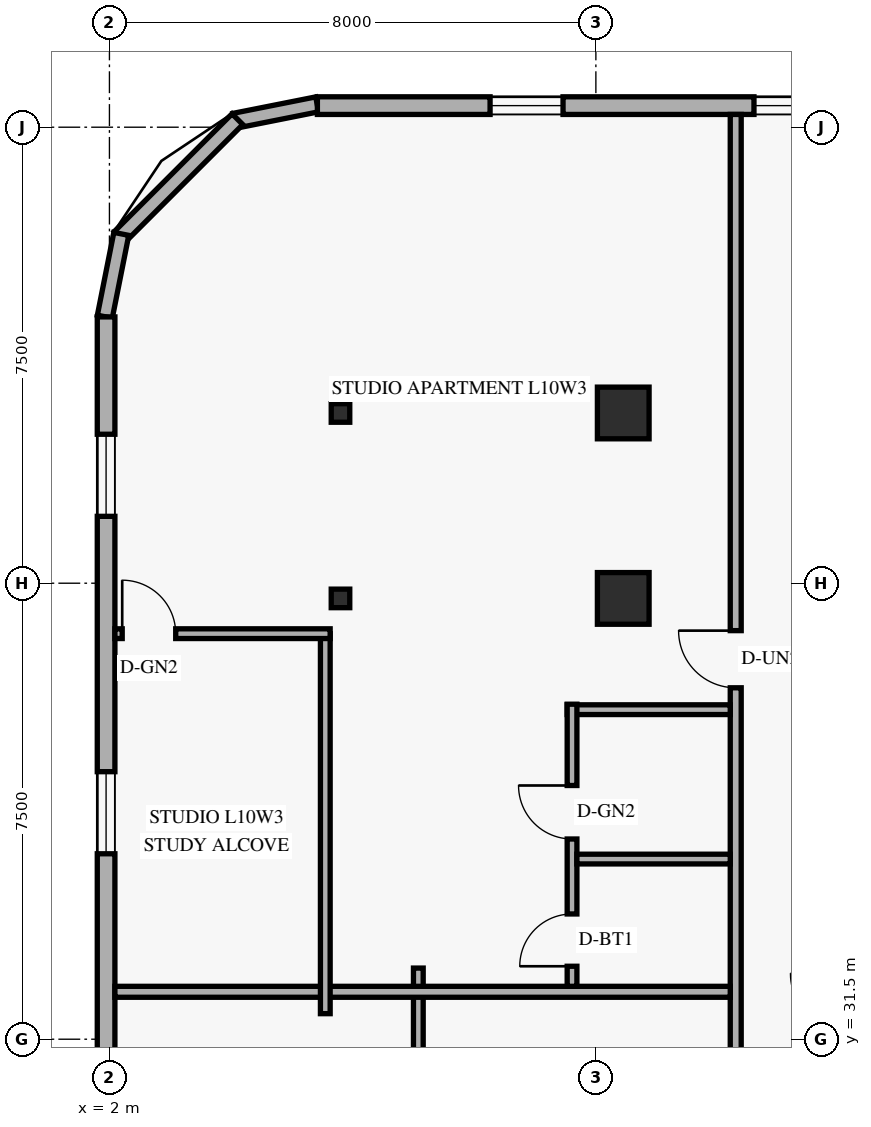
"""IFC4 building model, lengths in metres.
Left out: names, types, materials, properties, quantities, classifications, styles, units other than length and angle.
Written with IfcOpenShell. Run it as: python <this file> out.ifc"""

import sys

from ifc_helpers import new_model, si_unit, direction, frame, frame_2d, origin, origin_2d, place, context, subcontext, project, spatial, rectangle, hollow_rectangle, extrude, element, fill, save


model = new_model("IFC4")
c1 = context("Model", 3, precision=1e-05, world=origin(), true_north=direction((0.0, 1.0)))
c2 = subcontext(c1, "Body", "Model", "MODEL_VIEW")
j1 = project(units=[si_unit("LENGTHUNIT", "METRE"), si_unit("PLANEANGLEUNIT", "RADIAN")], contexts=[c1])
p1 = place(None, origin())
s1 = spatial("IfcSite", under=j1, at=p1, CompositionType="ELEMENT")
p2 = place(p1, origin())
s2 = spatial("IfcBuilding", under=s1, at=p2, CompositionType="ELEMENT")
p3 = place(p2, frame((0.0, 0.0, 42.0)))
s3 = spatial("IfcBuildingStorey", under=s2, at=p3, CompositionType="ELEMENT", Elevation=42.0)
for number, where, z_axis, x_axis in (
    (1, (5.8, 38.75, 0.0), (0.0, 0.0, 1.0), (1.0, 0.0, 0.0)),
    (2, (5.8, 41.8, 0.0), (0.0, 0.0, 1.0), (1.0, 0.0, 0.0)),
):
    element("IfcColumn", number, at=place(p3, frame(where, z_axis=z_axis, x_axis=x_axis)), inside=s3, PredefinedType="COLUMN", context=c2, shape_type="SweptSolid", body=[
        extrude(hollow_rectangle(XDim=0.305, YDim=0.305, WallThickness=0.013, at=origin_2d()), origin(), (0.0, 0.0, 1.0), 3.6),
    ])
for number, where, z_axis, x_axis in (
    (3, (10.45, 38.75, 0.0), (0.0, 0.0, 1.0), (1.0, 0.0, 0.0)),
    (4, (10.45, 41.8, 0.0), (0.0, 0.0, 1.0), (1.0, 0.0, 0.0)),
):
    element("IfcColumn", number, at=place(p3, frame(where, z_axis=z_axis, x_axis=x_axis)), inside=s3, PredefinedType="COLUMN", context=c2, shape_type="SweptSolid", body=[
        extrude(rectangle(XDim=0.85, YDim=0.85, at=origin_2d()), origin(), (0.0, 0.0, 1.0), 3.6),
    ])
p4 = place(p3, frame((5.417, 46.876, 0.0), z_axis=(0.0, 0.0, 1.0), x_axis=(-0.980809899341, -0.19496651342, 0.0)))
e5 = element("IfcWall", 5, at=p4, inside=s3, PredefinedType="SOLIDWALL", context=c2, shape_type="SweptSolid", body=[
    extrude(rectangle(XDim=1.389, YDim=0.25, at=frame_2d((0.694, 0.0))), origin(), (0.0, 0.0, 1.0), 3.36),
])
p5 = place(p3, frame((4.105, 46.632, 0.0), z_axis=(0.0, 0.0, 1.0), x_axis=(-0.707106781187, -0.707106781187, 0.0)))
e6 = element("IfcWall", 6, at=p5, inside=s3, PredefinedType="SOLIDWALL", context=c2, shape_type="SweptSolid", body=[
    extrude(rectangle(XDim=2.739, YDim=0.25, at=frame_2d((1.37, 0.0))), origin(), (0.0, 0.0, 1.0), 3.36),
])
p6 = place(p3, frame((2.195, 44.746, 0.0), z_axis=(0.0, 0.0, 1.0), x_axis=(-0.19496651342, -0.980809899341, 0.0)))
e7 = element("IfcWall", 7, at=p6, inside=s3, PredefinedType="SOLIDWALL", context=c2, shape_type="SweptSolid", body=[
    extrude(rectangle(XDim=1.389, YDim=0.25, at=frame_2d((0.694, 0.0))), origin(), (0.0, 0.0, 1.0), 3.36),
])
p7 = place(p3, frame((44.98, 46.855, 0.0), z_axis=(0.0, 0.0, 1.0), x_axis=(-1.0, 0.0, 0.0)))
e8 = element("IfcWall", 8, at=p7, inside=s3, PredefinedType="SOLIDWALL", context=c2, shape_type="SweptSolid", body=[
    extrude(rectangle(XDim=39.56, YDim=0.29, at=frame_2d((19.78, 0.0))), origin(), (0.0, 0.0, 1.0), 3.36),
])
p8 = place(p7, frame((35.52, 0.0, 0.85)))
e9 = element("IfcOpeningElement", 9, at=p8, cuts=e8, PredefinedType="OPENING", context=c2, shape_type="SweptSolid", body=[
    extrude(rectangle(XDim=1.2, YDim=1.5, at=frame_2d((0.6, 0.75))), frame((0.0, 0.155, 0.0), z_axis=(0.0, -1.0, 0.0), x_axis=(1.0, 0.0, 0.0)), (0.0, 0.0, 1.0), 0.31),
])
p9 = place(p7, frame((31.18, 0.0, 0.85)))
e10 = element("IfcOpeningElement", 10, at=p9, cuts=e8, PredefinedType="OPENING", context=c2, shape_type="SweptSolid", body=[
    extrude(rectangle(XDim=1.2, YDim=1.5, at=frame_2d((0.6, 0.75))), frame((0.0, 0.155, 0.0), z_axis=(0.0, -1.0, 0.0), x_axis=(1.0, 0.0, 0.0)), (0.0, 0.0, 1.0), 0.31),
])
p10 = place(p7, frame((25.909, 0.0, 0.85)))
e11 = element("IfcOpeningElement", 11, at=p10, cuts=e8, PredefinedType="OPENING", context=c2, shape_type="SweptSolid", body=[
    extrude(rectangle(XDim=1.2, YDim=1.5, at=frame_2d((0.6, 0.75))), frame((0.0, 0.155, 0.0), z_axis=(0.0, -1.0, 0.0), x_axis=(1.0, 0.0, 0.0)), (0.0, 0.0, 1.0), 0.31),
])
p11 = place(p7, frame((18.874, 0.0, 0.85)))
e12 = element("IfcOpeningElement", 12, at=p11, cuts=e8, PredefinedType="OPENING", context=c2, shape_type="SweptSolid", body=[
    extrude(rectangle(XDim=1.2, YDim=1.5, at=frame_2d((0.6, 0.75))), frame((0.0, 0.155, 0.0), z_axis=(0.0, -1.0, 0.0), x_axis=(1.0, 0.0, 0.0)), (0.0, 0.0, 1.0), 0.31),
])
p12 = place(p7, frame((12.584, 0.0, 0.85)))
e13 = element("IfcOpeningElement", 13, at=p12, cuts=e8, PredefinedType="OPENING", context=c2, shape_type="SweptSolid", body=[
    extrude(rectangle(XDim=1.2, YDim=1.5, at=frame_2d((0.6, 0.75))), frame((0.0, 0.155, 0.0), z_axis=(0.0, -1.0, 0.0), x_axis=(1.0, 0.0, 0.0)), (0.0, 0.0, 1.0), 0.31),
])
p13 = place(p7, frame((7.895, 0.0, 0.85)))
e14 = element("IfcOpeningElement", 14, at=p13, cuts=e8, PredefinedType="OPENING", context=c2, shape_type="SweptSolid", body=[
    extrude(rectangle(XDim=1.2, YDim=1.5, at=frame_2d((0.6, 0.75))), frame((0.0, 0.155, 0.0), z_axis=(0.0, -1.0, 0.0), x_axis=(1.0, 0.0, 0.0)), (0.0, 0.0, 1.0), 0.31),
])
p14 = place(p7, frame((5.408, 0.0, 0.85)))
e15 = element("IfcOpeningElement", 15, at=p14, cuts=e8, PredefinedType="OPENING", context=c2, shape_type="SweptSolid", body=[
    extrude(rectangle(XDim=1.2, YDim=1.5, at=frame_2d((0.6, 0.75))), frame((0.0, 0.155, 0.0), z_axis=(0.0, -1.0, 0.0), x_axis=(1.0, 0.0, 0.0)), (0.0, 0.0, 1.0), 0.31),
])
p15 = place(p7, frame((1.693, 0.0, 0.85)))
e16 = element("IfcOpeningElement", 16, at=p15, cuts=e8, PredefinedType="OPENING", context=c2, shape_type="SweptSolid", body=[
    extrude(rectangle(XDim=1.2, YDim=1.5, at=frame_2d((0.6, 0.75))), frame((0.0, 0.155, 0.0), z_axis=(0.0, -1.0, 0.0), x_axis=(1.0, 0.0, 0.0)), (0.0, 0.0, 1.0), 0.31),
])
p16 = place(p3, frame((1.945, 43.38, 0.0), z_axis=(0.0, 0.0, 1.0), x_axis=(0.0, -1.0, 0.0)))
e17 = element("IfcWall", 17, at=p16, inside=s3, PredefinedType="SOLIDWALL", context=c2, shape_type="SweptSolid", body=[
    extrude(rectangle(XDim=38.76, YDim=0.29, at=frame_2d((19.38, 0.0))), origin(), (0.0, 0.0, 1.0), 3.36),
])
p17 = place(p16, frame((34.125, 0.0, 0.85)))
e18 = element("IfcOpeningElement", 18, at=p17, cuts=e17, PredefinedType="OPENING", context=c2, shape_type="SweptSolid", body=[
    extrude(rectangle(XDim=1.35, YDim=1.55, at=frame_2d((0.675, 0.775))), frame((0.0, 0.155, 0.0), z_axis=(0.0, -1.0, 0.0), x_axis=(1.0, 0.0, 0.0)), (0.0, 0.0, 1.0), 0.31),
])
p18 = place(p16, frame((28.115, 0.0, 0.85)))
e19 = element("IfcOpeningElement", 19, at=p18, cuts=e17, PredefinedType="OPENING", context=c2, shape_type="SweptSolid", body=[
    extrude(rectangle(XDim=1.35, YDim=1.55, at=frame_2d((0.675, 0.775))), frame((0.0, 0.155, 0.0), z_axis=(0.0, -1.0, 0.0), x_axis=(1.0, 0.0, 0.0)), (0.0, 0.0, 1.0), 0.31),
])
p19 = place(p16, frame((24.084, 0.0, 0.85)))
e20 = element("IfcOpeningElement", 20, at=p19, cuts=e17, PredefinedType="OPENING", context=c2, shape_type="SweptSolid", body=[
    extrude(rectangle(XDim=1.35, YDim=1.55, at=frame_2d((0.675, 0.775))), frame((0.0, 0.155, 0.0), z_axis=(0.0, -1.0, 0.0), x_axis=(1.0, 0.0, 0.0)), (0.0, 0.0, 1.0), 0.31),
])
p20 = place(p16, frame((18.259, 0.0, 0.85)))
e21 = element("IfcOpeningElement", 21, at=p20, cuts=e17, PredefinedType="OPENING", context=c2, shape_type="SweptSolid", body=[
    extrude(rectangle(XDim=1.35, YDim=1.55, at=frame_2d((0.675, 0.775))), frame((0.0, 0.155, 0.0), z_axis=(0.0, -1.0, 0.0), x_axis=(1.0, 0.0, 0.0)), (0.0, 0.0, 1.0), 0.31),
])
p21 = place(p16, frame((12.42, 0.0, 0.85)))
e22 = element("IfcOpeningElement", 22, at=p21, cuts=e17, PredefinedType="OPENING", context=c2, shape_type="SweptSolid", body=[
    extrude(rectangle(XDim=1.35, YDim=1.55, at=frame_2d((0.675, 0.775))), frame((0.0, 0.155, 0.0), z_axis=(0.0, -1.0, 0.0), x_axis=(1.0, 0.0, 0.0)), (0.0, 0.0, 1.0), 0.31),
])
p22 = place(p16, frame((7.48, 0.0, 0.85)))
e23 = element("IfcOpeningElement", 23, at=p22, cuts=e17, PredefinedType="OPENING", context=c2, shape_type="SweptSolid", body=[
    extrude(rectangle(XDim=1.35, YDim=1.55, at=frame_2d((0.675, 0.775))), frame((0.0, 0.155, 0.0), z_axis=(0.0, -1.0, 0.0), x_axis=(1.0, 0.0, 0.0)), (0.0, 0.0, 1.0), 0.31),
])
p23 = place(p16, frame((1.93, 0.0, 0.85)))
e24 = element("IfcOpeningElement", 24, at=p23, cuts=e17, PredefinedType="OPENING", context=c2, shape_type="SweptSolid", body=[
    extrude(rectangle(XDim=1.35, YDim=1.55, at=frame_2d((0.675, 0.775))), frame((0.0, 0.155, 0.0), z_axis=(0.0, -1.0, 0.0), x_axis=(1.0, 0.0, 0.0)), (0.0, 0.0, 1.0), 0.31),
])
p24 = place(p3, frame((12.3, 1.29, 0.0), z_axis=(0.0, 0.0, 1.0), x_axis=(0.0, 1.0, 0.0)))
e25 = element("IfcWall", 25, at=p24, inside=s3, PredefinedType="STANDARD", context=c2, shape_type="SweptSolid", body=[
    extrude(rectangle(XDim=45.42, YDim=0.18, at=frame_2d((22.71, 0.0))), origin(), (0.0, 0.0, 1.0), 2.649),
])
p25 = place(p24, frame((8.06, 0.0, 0.0)))
e26 = element("IfcOpeningElement", 26, at=p25, cuts=e25, PredefinedType="OPENING", context=c2, shape_type="SweptSolid", body=[
    extrude(rectangle(XDim=0.94, YDim=2.15, at=frame_2d((0.47, 1.075))), frame((0.0, 0.1, 0.0), z_axis=(0.0, -1.0, 0.0), x_axis=(1.0, 0.0, 0.0)), (0.0, 0.0, 1.0), 0.2),
])
p26 = place(p24, frame((21.021, 0.0, 0.0)))
e27 = element("IfcOpeningElement", 27, at=p26, cuts=e25, PredefinedType="OPENING", context=c2, shape_type="SweptSolid", body=[
    extrude(rectangle(XDim=0.94, YDim=2.15, at=frame_2d((0.47, 1.075))), frame((0.0, 0.1, 0.0), z_axis=(0.0, -1.0, 0.0), x_axis=(1.0, 0.0, 0.0)), (0.0, 0.0, 1.0), 0.2),
])
p27 = place(p24, frame((35.99, 0.0, 0.0)))
e28 = element("IfcOpeningElement", 28, at=p27, cuts=e25, PredefinedType="OPENING", context=c2, shape_type="SweptSolid", body=[
    extrude(rectangle(XDim=0.94, YDim=2.15, at=frame_2d((0.47, 1.075))), frame((0.0, 0.1, 0.0), z_axis=(0.0, -1.0, 0.0), x_axis=(1.0, 0.0, 0.0)), (0.0, 0.0, 1.0), 0.2),
])
p28 = place(p3, frame((7.08, 28.21, 0.0), z_axis=(0.0, 0.0, 1.0), x_axis=(0.0, 1.0, 0.0)))
e29 = element("IfcWall", 29, at=p28, inside=s3, PredefinedType="PARTITIONING", context=c2, shape_type="SweptSolid", body=[
    extrude(rectangle(XDim=4.46, YDim=0.16, at=frame_2d((2.23, 0.0))), origin(), (0.0, 0.0, 1.0), 2.649),
])
p29 = place(p3, frame((2.09, 32.28, 0.0), z_axis=(0.0, 0.0, 1.0), x_axis=(1.0, 0.0, 0.0)))
e30 = element("IfcWall", 30, at=p29, inside=s3, PredefinedType="PARTITIONING", context=c2, shape_type="SweptSolid", body=[
    extrude(rectangle(XDim=10.12, YDim=0.18, at=frame_2d((5.06, 0.0))), origin(), (0.0, 0.0, 1.0), 2.649),
])
p30 = place(p3, frame((9.528, 36.92, 0.0), z_axis=(0.0, 0.0, 1.0), x_axis=(1.0, 0.0, 0.0)))
e31 = element("IfcWall", 31, at=p30, inside=s3, PredefinedType="PLUMBINGWALL", context=c2, shape_type="SweptSolid", body=[
    extrude(rectangle(XDim=2.682, YDim=0.16, at=frame_2d((1.341, 0.0))), origin(), (0.0, 0.0, 1.0), 2.649),
])
p31 = place(p3, frame((9.608, 32.37, 0.0), z_axis=(0.0, 0.0, 1.0), x_axis=(0.0, 1.0, 0.0)))
e32 = element("IfcWall", 32, at=p31, inside=s3, PredefinedType="PLUMBINGWALL", context=c2, shape_type="SweptSolid", body=[
    extrude(rectangle(XDim=4.64, YDim=0.16, at=frame_2d((2.32, 0.0))), origin(), (0.0, 0.0, 1.0), 2.932),
])
p32 = place(p31, frame((0.33, 0.0, 0.0)))
e33 = element("IfcOpeningElement", 33, at=p32, cuts=e32, PredefinedType="OPENING", context=c2, shape_type="SweptSolid", body=[
    extrude(rectangle(XDim=0.86, YDim=2.12, at=frame_2d((0.43, 1.06))), frame((0.0, 0.09, 0.0), z_axis=(0.0, -1.0, 0.0), x_axis=(1.0, 0.0, 0.0)), (0.0, 0.0, 1.0), 0.18),
])
p33 = place(p31, frame((2.423, 0.0, 0.0)))
e34 = element("IfcOpeningElement", 34, at=p33, cuts=e32, PredefinedType="OPENING", context=c2, shape_type="SweptSolid", body=[
    extrude(rectangle(XDim=0.88, YDim=2.12, at=frame_2d((0.44, 1.06))), frame((0.0, 0.09, 0.0), z_axis=(0.0, -1.0, 0.0), x_axis=(1.0, 0.0, 0.0)), (0.0, 0.0, 1.0), 0.18),
])
p34 = place(p3, frame((9.688, 34.463, 0.0), z_axis=(0.0, 0.0, 1.0), x_axis=(1.0, 0.0, 0.0)))
e35 = element("IfcWall", 35, at=p34, inside=s3, PredefinedType="PLUMBINGWALL", context=c2, shape_type="SweptSolid", body=[
    extrude(rectangle(XDim=2.522, YDim=0.16, at=frame_2d((1.261, 0.0))), origin(), (0.0, 0.0, 1.0), 2.649),
])
p35 = place(p3, frame((5.55, 31.92, 0.0), z_axis=(0.0, 0.0, 1.0), x_axis=(0.0, 1.0, 0.0)))
e36 = element("IfcWall", 36, at=p35, inside=s3, PredefinedType="PARTITIONING", context=c2, shape_type="SweptSolid", body=[
    extrude(rectangle(XDim=6.25, YDim=0.16, at=frame_2d((3.125, 0.0))), origin(), (0.0, 0.0, 1.0), 3.36),
])
p36 = place(p3, frame((2.09, 38.17, 0.0), z_axis=(0.0, 0.0, 1.0), x_axis=(1.0, 0.0, 0.0)))
e37 = element("IfcWall", 37, at=p36, inside=s3, PredefinedType="PARTITIONING", context=c2, shape_type="SweptSolid", body=[
    extrude(rectangle(XDim=3.54, YDim=0.16, at=frame_2d((1.77, 0.0))), origin(), (0.0, 0.0, 1.0), 3.36),
])
p37 = place(p36, frame((0.12, 0.0, 0.0)))
e38 = element("IfcOpeningElement", 38, at=p37, cuts=e37, PredefinedType="OPENING", context=c2, shape_type="SweptSolid", body=[
    extrude(rectangle(XDim=0.88, YDim=2.12, at=frame_2d((0.44, 1.06))), frame((0.0, 0.09, 0.0), z_axis=(0.0, -1.0, 0.0), x_axis=(1.0, 0.0, 0.0)), (0.0, 0.0, 1.0), 0.18),
])
p38 = place(p8, origin())
e39 = element("IfcWindow", 39, at=p38, inside=s3, PartitioningType="SINGLE_PANEL", PredefinedType="WINDOW", context=c2, shape_type="SweptSolid", body=[
    extrude(rectangle(XDim=1.2, YDim=1.5, at=frame_2d((0.6, 0.75))), frame((0.0, 0.03, 0.0), z_axis=(0.0, -1.0, 0.0), x_axis=(1.0, 0.0, 0.0)), (0.0, 0.0, 1.0), 0.06),
])
fill(e9, e39)
p39 = place(p9, origin())
e40 = element("IfcWindow", 40, at=p39, inside=s3, PartitioningType="SINGLE_PANEL", PredefinedType="WINDOW", context=c2, shape_type="SweptSolid", body=[
    extrude(rectangle(XDim=1.2, YDim=1.5, at=frame_2d((0.6, 0.75))), frame((0.0, 0.03, 0.0), z_axis=(0.0, -1.0, 0.0), x_axis=(1.0, 0.0, 0.0)), (0.0, 0.0, 1.0), 0.06),
])
fill(e10, e40)
p40 = place(p22, origin())
e41 = element("IfcWindow", 41, at=p40, inside=s3, PartitioningType="SINGLE_PANEL", PredefinedType="WINDOW", context=c2, shape_type="SweptSolid", body=[
    extrude(rectangle(XDim=1.35, YDim=1.55, at=frame_2d((0.675, 0.775))), frame((0.0, 0.03, 0.0), z_axis=(0.0, -1.0, 0.0), x_axis=(1.0, 0.0, 0.0)), (0.0, 0.0, 1.0), 0.06),
])
fill(e23, e41)
p41 = place(p23, origin())
e42 = element("IfcWindow", 42, at=p41, inside=s3, PartitioningType="SINGLE_PANEL", PredefinedType="WINDOW", context=c2, shape_type="SweptSolid", body=[
    extrude(rectangle(XDim=1.35, YDim=1.55, at=frame_2d((0.675, 0.775))), frame((0.0, 0.03, 0.0), z_axis=(0.0, -1.0, 0.0), x_axis=(1.0, 0.0, 0.0)), (0.0, 0.0, 1.0), 0.06),
])
fill(e24, e42)
p42 = place(p37, origin())
e43 = element("IfcDoor", 43, at=p42, inside=s3, OperationType="SINGLE_SWING_LEFT", PredefinedType="DOOR", context=c2, shape_type="SweptSolid", body=[
    extrude(rectangle(XDim=0.88, YDim=2.12, at=frame_2d((0.44, 1.06))), frame((0.0, 0.025, 0.0), z_axis=(0.0, -1.0, 0.0), x_axis=(1.0, 0.0, 0.0)), (0.0, 0.0, 1.0), 0.05),
])
fill(e38, e43)
p43 = place(p27, origin())
e44 = element("IfcDoor", 44, at=p43, inside=s3, OperationType="SINGLE_SWING_RIGHT", PredefinedType="DOOR", context=c2, shape_type="SweptSolid", body=[
    extrude(rectangle(XDim=0.94, YDim=2.15, at=frame_2d((0.47, 1.075))), frame((0.0, 0.025, 0.0), z_axis=(0.0, -1.0, 0.0), x_axis=(1.0, 0.0, 0.0)), (0.0, 0.0, 1.0), 0.05),
])
fill(e28, e44)
p44 = place(p32, origin())
e45 = element("IfcDoor", 45, at=p44, inside=s3, OperationType="SINGLE_SWING_LEFT", PredefinedType="DOOR", context=c2, shape_type="SweptSolid", body=[
    extrude(rectangle(XDim=0.86, YDim=2.12, at=frame_2d((0.43, 1.06))), frame((0.0, 0.025, 0.0), z_axis=(0.0, -1.0, 0.0), x_axis=(1.0, 0.0, 0.0)), (0.0, 0.0, 1.0), 0.05),
])
fill(e33, e45)
p45 = place(p33, origin())
e46 = element("IfcDoor", 46, at=p45, inside=s3, OperationType="SINGLE_SWING_RIGHT", PredefinedType="DOOR", context=c2, shape_type="SweptSolid", body=[
    extrude(rectangle(XDim=0.88, YDim=2.12, at=frame_2d((0.44, 1.06))), frame((0.0, 0.025, 0.0), z_axis=(0.0, -1.0, 0.0), x_axis=(1.0, 0.0, 0.0)), (0.0, 0.0, 1.0), 0.05),
])
fill(e34, e46)
save(model, sys.argv[1])
